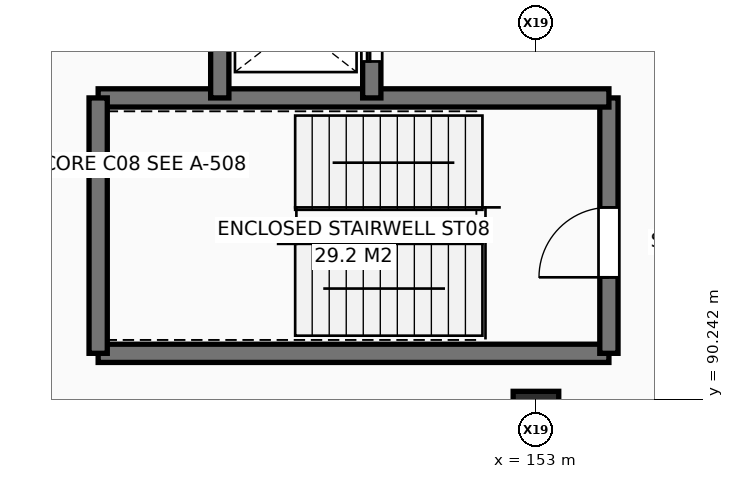
"""IFC4 building model, lengths in metres.
Left out: names, types, materials, properties, quantities, classifications, styles, units other than length and angle.
Written with IfcOpenShell. Run it as: python <this file> out.ifc"""

import sys

from ifc_helpers import new_model, si_unit, direction, frame, frame_2d, origin, origin_2d, place, context, subcontext, project, spatial, rectangle, extrude, element, fill, save


model = new_model("IFC4")
c1 = context("Model", 3, precision=1e-05, world=origin(), true_north=direction((0.0, 1.0)))
c2 = subcontext(c1, "Body", "Model", "MODEL_VIEW")
j1 = project(units=[si_unit("LENGTHUNIT", "METRE"), si_unit("PLANEANGLEUNIT", "RADIAN")], contexts=[c1])
p1 = place(None, origin())
s1 = spatial("IfcSite", under=j1, at=p1, CompositionType="ELEMENT")
p2 = place(p1, origin())
s2 = spatial("IfcBuilding", under=s1, at=p2, CompositionType="ELEMENT")
p3 = place(p2, frame((0.0, 0.0, 5.4)))
s3 = spatial("IfcBuildingStorey", under=s2, at=p3, CompositionType="ELEMENT", Elevation=5.4)
p4 = place(p3, frame((153.0, 90.0, 0.0), z_axis=(0.0, 0.0, 1.0), x_axis=(1.0, 0.0, 0.0)))
e1 = element("IfcColumn", 1, at=p4, inside=s3, PredefinedType="COLUMN", context=c2, shape_type="SweptSolid", body=[
    extrude(rectangle(XDim=0.75, YDim=0.75, at=origin_2d()), origin(), (0.0, 0.0, 1.0), 4.2),
])
p5 = place(p3, frame((145.8, 91.0, 0.0), z_axis=(0.0, 0.0, 1.0), x_axis=(1.0, 0.0, 0.0)))
e2 = element("IfcWall", 2, at=p5, inside=s3, PredefinedType="SHEAR", context=c2, shape_type="SweptSolid", body=[
    extrude(rectangle(XDim=8.4, YDim=0.3, at=frame_2d((4.2, 0.0))), origin(), (0.0, 0.0, 1.0), 3.92),
])
p6 = place(p3, frame((154.2, 91.0, 0.0), z_axis=(0.0, 0.0, 1.0), x_axis=(0.0, 1.0, 0.0)))
e3 = element("IfcWall", 3, at=p6, inside=s3, PredefinedType="SHEAR", context=c2, shape_type="SweptSolid", body=[
    extrude(rectangle(XDim=4.2, YDim=0.3, at=frame_2d((2.1, 0.0))), origin(), (0.0, 0.0, 1.0), 3.92),
])
p7 = place(p6, frame((1.25, 0.0, 0.0)))
e4 = element("IfcOpeningElement", 4, at=p7, cuts=e3, PredefinedType="OPENING", context=c2, shape_type="SweptSolid", body=[
    extrude(rectangle(XDim=1.15, YDim=2.2, at=frame_2d((0.575, 1.1))), frame((0.0, 0.16, 0.0), z_axis=(0.0, -1.0, 0.0), x_axis=(1.0, 0.0, 0.0)), (0.0, 0.0, 1.0), 0.32),
])
p8 = place(p3, frame((154.2, 95.2, 0.0), z_axis=(0.0, 0.0, 1.0), x_axis=(-1.0, 0.0, 0.0)))
e5 = element("IfcWall", 5, at=p8, inside=s3, PredefinedType="SHEAR", context=c2, shape_type="SweptSolid", body=[
    extrude(rectangle(XDim=8.4, YDim=0.3, at=frame_2d((4.2, 0.0))), origin(), (0.0, 0.0, 1.0), 3.92),
])
p9 = place(p3, frame((145.8, 95.2, 0.0), z_axis=(0.0, 0.0, 1.0), x_axis=(0.0, -1.0, 0.0)))
e6 = element("IfcWall", 6, at=p9, inside=s3, PredefinedType="SHEAR", context=c2, shape_type="SweptSolid", body=[
    extrude(rectangle(XDim=4.2, YDim=0.3, at=frame_2d((2.1, 0.0))), origin(), (0.0, 0.0, 1.0), 3.92),
])
p10 = place(p3, frame((147.8, 97.6, 0.0), z_axis=(0.0, 0.0, 1.0), x_axis=(0.0, -1.0, 0.0)))
e7 = element("IfcWall", 7, at=p10, inside=s3, PredefinedType="SHEAR", context=c2, shape_type="SweptSolid", body=[
    extrude(rectangle(XDim=2.4, YDim=0.3, at=frame_2d((1.2, 0.0))), origin(), (0.0, 0.0, 1.0), 3.92),
])
p11 = place(p3, frame((150.3, 95.2, 0.0), z_axis=(0.0, 0.0, 1.0), x_axis=(0.0, 1.0, 0.0)))
e8 = element("IfcWall", 8, at=p11, inside=s3, PredefinedType="SHEAR", context=c2, shape_type="SweptSolid", body=[
    extrude(rectangle(XDim=2.4, YDim=0.3, at=frame_2d((1.2, 0.0))), origin(), (0.0, 0.0, 1.0), 3.92),
])
p12 = place(p11, frame((0.6, 0.0, 0.0)))
e9 = element("IfcOpeningElement", 9, at=p12, cuts=e8, PredefinedType="OPENING", context=c2, shape_type="SweptSolid", body=[
    extrude(rectangle(XDim=1.2, YDim=2.25, at=frame_2d((0.6, 1.125))), frame((0.0, 0.16, 0.0), z_axis=(0.0, -1.0, 0.0), x_axis=(1.0, 0.0, 0.0)), (0.0, 0.0, 1.0), 0.32),
])
p13 = place(p7, origin())
e10 = element("IfcDoor", 10, at=p13, inside=s3, OperationType="SINGLE_SWING_LEFT", PredefinedType="DOOR", context=c2, shape_type="SweptSolid", body=[
    extrude(rectangle(XDim=1.15, YDim=2.2, at=frame_2d((0.575, 1.1))), frame((0.0, 0.025, 0.0), z_axis=(0.0, -1.0, 0.0), x_axis=(1.0, 0.0, 0.0)), (0.0, 0.0, 1.0), 0.05),
])
fill(e4, e10)
p14 = place(p12, origin())
e11 = element("IfcDoor", 11, at=p14, inside=s3, OperationType="SLIDING_TO_LEFT", PredefinedType="DOOR", context=c2, shape_type="SweptSolid", body=[
    extrude(rectangle(XDim=1.2, YDim=2.25, at=frame_2d((0.6, 1.125))), frame((0.0, 0.025, 0.0), z_axis=(0.0, -1.0, 0.0), x_axis=(1.0, 0.0, 0.0)), (0.0, 0.0, 1.0), 0.05),
])
fill(e9, e11)
save(model, sys.argv[1])
